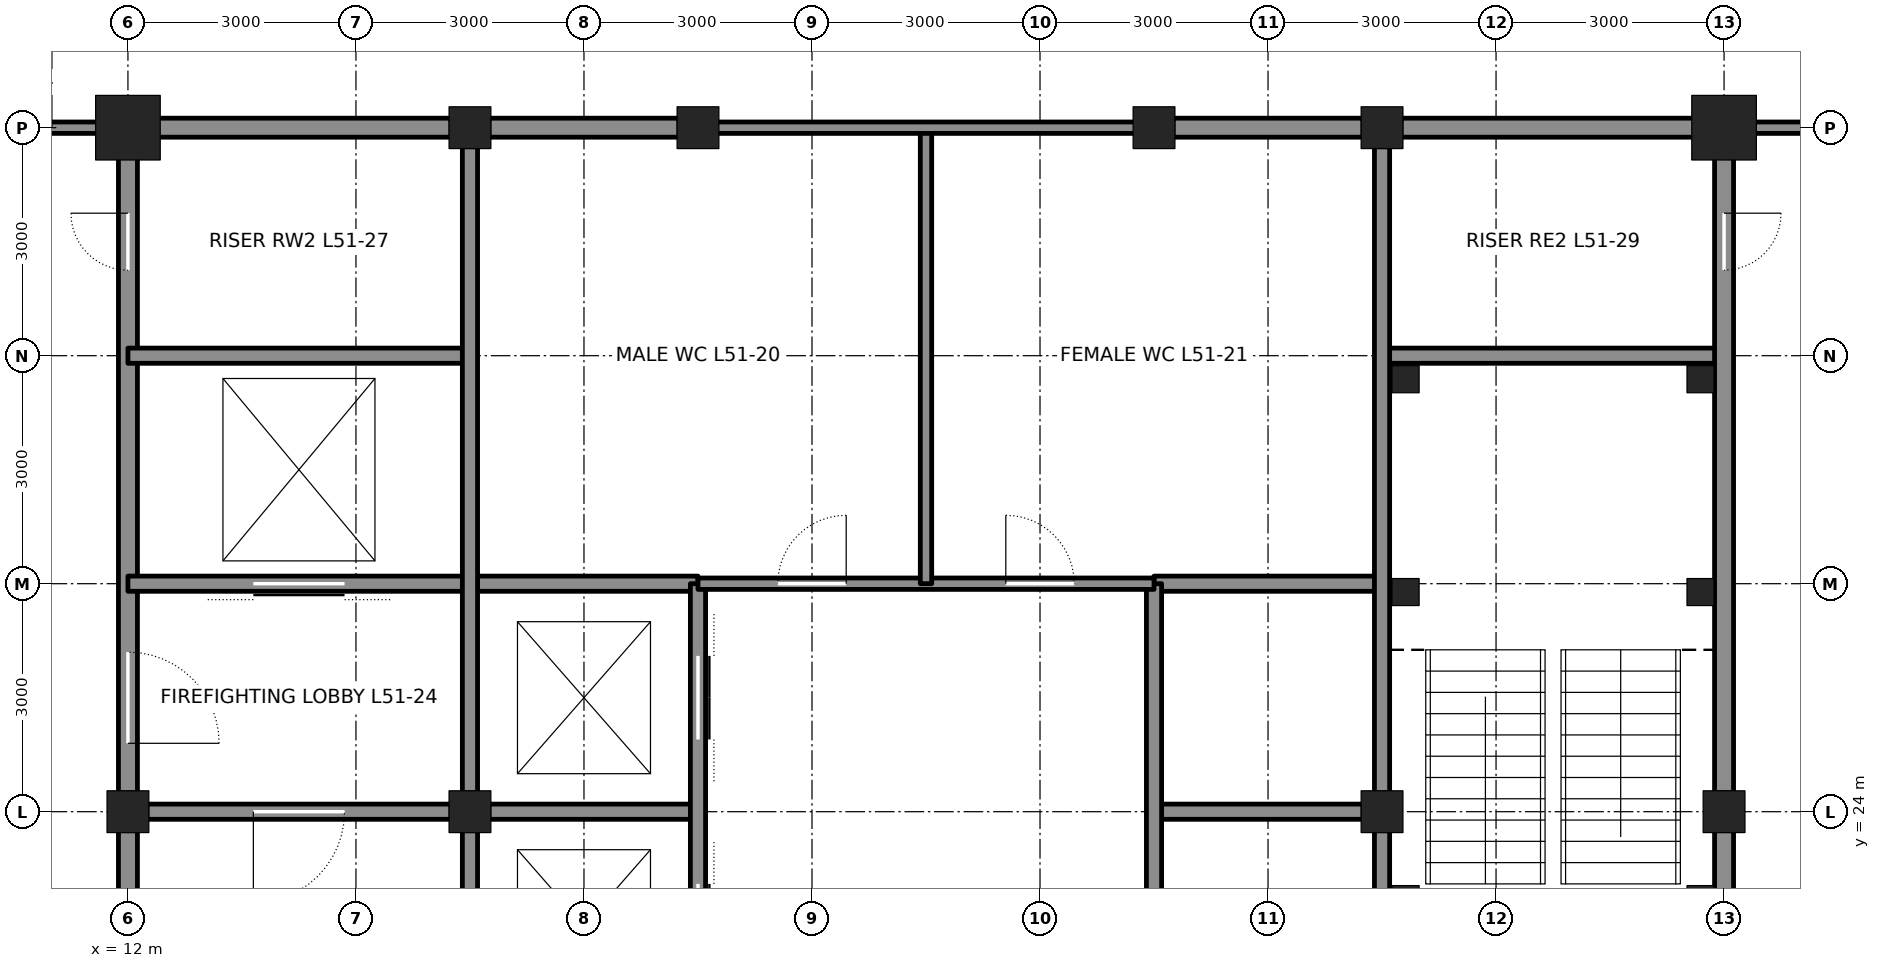
"""IFC4 building model, lengths in metres.
Left out: names, types, materials, properties, quantities, classifications, styles, units other than length and angle.
Written with IfcOpenShell. Run it as: python <this file> out.ifc"""

import sys

from ifc_helpers import new_model, si_unit, direction, frame, frame_2d, origin, origin_2d, place, context, subcontext, project, spatial, rectangle, hollow_rectangle, extrude, element, fill, save


model = new_model("IFC4")
c1 = context("Model", 3, precision=1e-05, world=origin(), true_north=direction((0.0, 1.0)))
c2 = subcontext(c1, "Body", "Model", "MODEL_VIEW")
j1 = project(units=[si_unit("LENGTHUNIT", "METRE"), si_unit("PLANEANGLEUNIT", "RADIAN")], contexts=[c1])
p1 = place(None, origin())
s1 = spatial("IfcSite", under=j1, at=p1, CompositionType="ELEMENT")
p2 = place(p1, origin())
s2 = spatial("IfcBuilding", under=s1, at=p2, CompositionType="ELEMENT")
p3 = place(p2, frame((0.0, 0.0, 230.7)))
s3 = spatial("IfcBuildingStorey", under=s2, at=p3, CompositionType="ELEMENT", Elevation=230.7)
p4 = place(p3, frame((12.0, 33.0, 0.0), z_axis=(0.0, 0.0, 1.0), x_axis=(1.0, 0.0, 0.0)))
e1 = element("IfcColumn", 1, at=p4, inside=s3, PredefinedType="COLUMN", context=c2, shape_type="SweptSolid", body=[
    extrude(hollow_rectangle(XDim=0.85, YDim=0.85, WallThickness=0.085, at=origin_2d()), origin(), (0.0, 0.0, 1.0), 4.2),
])
for number, where, z_axis, x_axis in (
    (2, (16.5, 33.0, 0.0), (0.0, 0.0, 1.0), (1.0, 0.0, 0.0)),
    (3, (19.5, 33.0, 0.0), (0.0, 0.0, 1.0), (1.0, 0.0, 0.0)),
    (4, (25.5, 33.0, 0.0), (0.0, 0.0, 1.0), (1.0, 0.0, 0.0)),
    (5, (28.5, 33.0, 0.0), (0.0, 0.0, 1.0), (1.0, 0.0, 0.0)),
):
    element("IfcColumn", number, at=place(p3, frame(where, z_axis=z_axis, x_axis=x_axis)), inside=s3, PredefinedType="COLUMN", context=c2, shape_type="SweptSolid", body=[
        extrude(hollow_rectangle(XDim=0.55, YDim=0.55, WallThickness=0.045, at=origin_2d()), origin(), (0.0, 0.0, 1.0), 4.2),
    ])
p5 = place(p3, frame((33.0, 33.0, 0.0), z_axis=(0.0, 0.0, 1.0), x_axis=(1.0, 0.0, 0.0)))
e6 = element("IfcColumn", 6, at=p5, inside=s3, PredefinedType="COLUMN", context=c2, shape_type="SweptSolid", body=[
    extrude(hollow_rectangle(XDim=0.85, YDim=0.85, WallThickness=0.085, at=origin_2d()), origin(), (0.0, 0.0, 1.0), 4.2),
])
for number, where, z_axis, x_axis in (
    (7, (12.0, 24.0, 0.0), (0.0, 0.0, 1.0), (1.0, 0.0, 0.0)),
    (8, (33.0, 24.0, 0.0), (0.0, 0.0, 1.0), (1.0, 0.0, 0.0)),
    (9, (16.5, 24.0, 0.0), (0.0, 0.0, 1.0), (1.0, 0.0, 0.0)),
    (10, (28.5, 24.0, 0.0), (0.0, 0.0, 1.0), (1.0, 0.0, 0.0)),
):
    element("IfcColumn", number, at=place(p3, frame(where, z_axis=z_axis, x_axis=x_axis)), inside=s3, PredefinedType="COLUMN", context=c2, shape_type="SweptSolid", body=[
        extrude(hollow_rectangle(XDim=0.55, YDim=0.55, WallThickness=0.045, at=origin_2d()), origin(), (0.0, 0.0, 1.0), 4.2),
    ])
p6 = place(p3, frame((12.0, 21.25, 0.0), z_axis=(0.0, 0.0, 1.0), x_axis=(0.0, 1.0, 0.0)))
e11 = element("IfcWall", 11, at=p6, inside=s3, PredefinedType="SOLIDWALL", context=c2, shape_type="SweptSolid", body=[
    extrude(rectangle(XDim=2.5, YDim=0.25, at=frame_2d((1.25, 0.0))), origin(), (0.0, 0.0, 1.0), 3.113),
])
p7 = place(p3, frame((12.0, 24.25, 0.0), z_axis=(0.0, 0.0, 1.0), x_axis=(0.0, 1.0, 0.0)))
e12 = element("IfcWall", 12, at=p7, inside=s3, PredefinedType="SOLIDWALL", context=c2, shape_type="SweptSolid", body=[
    extrude(rectangle(XDim=8.5, YDim=0.25, at=frame_2d((4.25, 0.0))), origin(), (0.0, 0.0, 1.0), 3.113),
])
p8 = place(p7, frame((0.65, 0.0, 0.0)))
e13 = element("IfcOpeningElement", 13, at=p8, cuts=e12, PredefinedType="OPENING", context=c2, shape_type="SweptSolid", body=[
    extrude(rectangle(XDim=1.2, YDim=2.1, at=frame_2d((0.6, 1.05))), frame((0.0, 0.135, 0.0), z_axis=(0.0, -1.0, 0.0), x_axis=(1.0, 0.0, 0.0)), (0.0, 0.0, 1.0), 0.27),
])
p9 = place(p7, frame((6.875, 0.0, 0.0)))
e14 = element("IfcOpeningElement", 14, at=p9, cuts=e12, PredefinedType="OPENING", context=c2, shape_type="SweptSolid", body=[
    extrude(rectangle(XDim=0.75, YDim=2.1, at=frame_2d((0.375, 1.05))), frame((0.0, 0.135, 0.0), z_axis=(0.0, -1.0, 0.0), x_axis=(1.0, 0.0, 0.0)), (0.0, 0.0, 1.0), 0.27),
])
p10 = place(p3, frame((12.25, 24.0, 0.0), z_axis=(0.0, 0.0, 1.0), x_axis=(1.0, 0.0, 0.0)))
e15 = element("IfcWall", 15, at=p10, inside=s3, PredefinedType="SOLIDWALL", context=c2, shape_type="SweptSolid", body=[
    extrude(rectangle(XDim=4.0, YDim=0.2, at=frame_2d((2.0, 0.0))), origin(), (0.0, 0.0, 1.0), 3.09),
])
p11 = place(p10, frame((1.4, 0.0, 0.0)))
e16 = element("IfcOpeningElement", 16, at=p11, cuts=e15, PredefinedType="OPENING", context=c2, shape_type="SweptSolid", body=[
    extrude(rectangle(XDim=1.2, YDim=2.1, at=frame_2d((0.6, 1.05))), frame((0.0, 0.11, 0.0), z_axis=(0.0, -1.0, 0.0), x_axis=(1.0, 0.0, 0.0)), (0.0, 0.0, 1.0), 0.22),
])
for number, where, z_axis, x_axis in (
    (17, (16.75, 24.0, 0.0), (0.0, 0.0, 1.0), (1.0, 0.0, 0.0)),
    (18, (25.5, 24.0, 0.0), (0.0, 0.0, 1.0), (1.0, 0.0, 0.0)),
):
    element("IfcWall", number, at=place(p3, frame(where, z_axis=z_axis, x_axis=x_axis)), inside=s3, PredefinedType="SOLIDWALL", context=c2, shape_type="SweptSolid", body=[
        extrude(rectangle(XDim=2.75, YDim=0.2, at=frame_2d((1.375, 0.0))), origin(), (0.0, 0.0, 1.0), 3.09),
    ])
p12 = place(p3, frame((12.0, 27.0, 0.0), z_axis=(0.0, 0.0, 1.0), x_axis=(1.0, 0.0, 0.0)))
e19 = element("IfcWall", 19, at=p12, inside=s3, PredefinedType="SOLIDWALL", context=c2, shape_type="SweptSolid", body=[
    extrude(rectangle(XDim=7.5, YDim=0.2, at=frame_2d((3.75, 0.0))), origin(), (0.0, 0.0, 1.0), 4.04),
])
p13 = place(p12, frame((1.65, 0.0, 0.0)))
e20 = element("IfcOpeningElement", 20, at=p13, cuts=e19, PredefinedType="OPENING", context=c2, shape_type="SweptSolid", body=[
    extrude(rectangle(XDim=1.2, YDim=2.1, at=frame_2d((0.6, 1.05))), frame((0.0, 0.11, 0.0), z_axis=(0.0, -1.0, 0.0), x_axis=(1.0, 0.0, 0.0)), (0.0, 0.0, 1.0), 0.22),
])
p14 = place(p3, frame((25.5, 27.0, 0.0), z_axis=(0.0, 0.0, 1.0), x_axis=(1.0, 0.0, 0.0)))
e21 = element("IfcWall", 21, at=p14, inside=s3, PredefinedType="SOLIDWALL", context=c2, shape_type="SweptSolid", body=[
    extrude(rectangle(XDim=3.0, YDim=0.2, at=frame_2d((1.5, 0.0))), origin(), (0.0, 0.0, 1.0), 4.04),
])
for number, where, z_axis, x_axis in (
    (22, (12.0, 30.0, 0.0), (0.0, 0.0, 1.0), (1.0, 0.0, 0.0)),
    (23, (28.5, 30.0, 0.0), (0.0, 0.0, 1.0), (1.0, 0.0, 0.0)),
):
    element("IfcWall", number, at=place(p3, frame(where, z_axis=z_axis, x_axis=x_axis)), inside=s3, PredefinedType="SOLIDWALL", context=c2, shape_type="SweptSolid", body=[
        extrude(rectangle(XDim=4.5, YDim=0.2, at=frame_2d((2.25, 0.0))), origin(), (0.0, 0.0, 1.0), 4.04),
    ])
p15 = place(p3, frame((12.25, 33.0, 0.0), z_axis=(0.0, 0.0, 1.0), x_axis=(1.0, 0.0, 0.0)))
e24 = element("IfcWall", 24, at=p15, inside=s3, PredefinedType="SOLIDWALL", context=c2, shape_type="SweptSolid", body=[
    extrude(rectangle(XDim=4.0, YDim=0.25, at=frame_2d((2.0, 0.0))), origin(), (0.0, 0.0, 1.0), 3.182),
])
for number, where, z_axis, x_axis in (
    (25, (16.75, 33.0, 0.0), (0.0, 0.0, 1.0), (1.0, 0.0, 0.0)),
    (26, (25.75, 33.0, 0.0), (0.0, 0.0, 1.0), (1.0, 0.0, 0.0)),
):
    element("IfcWall", number, at=place(p3, frame(where, z_axis=z_axis, x_axis=x_axis)), inside=s3, PredefinedType="SOLIDWALL", context=c2, shape_type="SweptSolid", body=[
        extrude(rectangle(XDim=2.5, YDim=0.25, at=frame_2d((1.25, 0.0))), origin(), (0.0, 0.0, 1.0), 3.182),
    ])
p16 = place(p3, frame((28.75, 33.0, 0.0), z_axis=(0.0, 0.0, 1.0), x_axis=(1.0, 0.0, 0.0)))
e27 = element("IfcWall", 27, at=p16, inside=s3, PredefinedType="SOLIDWALL", context=c2, shape_type="SweptSolid", body=[
    extrude(rectangle(XDim=4.0, YDim=0.25, at=frame_2d((2.0, 0.0))), origin(), (0.0, 0.0, 1.0), 3.182),
])
p17 = place(p3, frame((16.5, 21.25, 0.0), z_axis=(0.0, 0.0, 1.0), x_axis=(0.0, 1.0, 0.0)))
e28 = element("IfcWall", 28, at=p17, inside=s3, PredefinedType="SOLIDWALL", context=c2, shape_type="SweptSolid", body=[
    extrude(rectangle(XDim=2.5, YDim=0.2, at=frame_2d((1.25, 0.0))), origin(), (0.0, 0.0, 1.0), 3.113),
])
p18 = place(p3, frame((16.5, 24.25, 0.0), z_axis=(0.0, 0.0, 1.0), x_axis=(0.0, 1.0, 0.0)))
e29 = element("IfcWall", 29, at=p18, inside=s3, PredefinedType="SOLIDWALL", context=c2, shape_type="SweptSolid", body=[
    extrude(rectangle(XDim=8.5, YDim=0.2, at=frame_2d((4.25, 0.0))), origin(), (0.0, 0.0, 1.0), 3.113),
])
p19 = place(p3, frame((19.5, 15.0, 0.0), z_axis=(0.0, 0.0, 1.0), x_axis=(0.0, 1.0, 0.0)))
e30 = element("IfcWall", 30, at=p19, inside=s3, PredefinedType="SOLIDWALL", context=c2, shape_type="SweptSolid", body=[
    extrude(rectangle(XDim=12.0, YDim=0.2, at=frame_2d((6.0, 0.0))), origin(), (0.0, 0.0, 1.0), 3.065),
])
p20 = place(p19, frame((0.95, 0.0, 0.0)))
e31 = element("IfcOpeningElement", 31, at=p20, cuts=e30, PredefinedType="OPENING", context=c2, shape_type="SweptSolid", body=[
    extrude(rectangle(XDim=1.1, YDim=2.1, at=frame_2d((0.55, 1.05))), frame((0.0, 0.11, 0.0), z_axis=(0.0, -1.0, 0.0), x_axis=(1.0, 0.0, 0.0)), (0.0, 0.0, 1.0), 0.22),
])
p21 = place(p19, frame((3.95, 0.0, 0.0)))
e32 = element("IfcOpeningElement", 32, at=p21, cuts=e30, PredefinedType="OPENING", context=c2, shape_type="SweptSolid", body=[
    extrude(rectangle(XDim=1.1, YDim=2.1, at=frame_2d((0.55, 1.05))), frame((0.0, 0.11, 0.0), z_axis=(0.0, -1.0, 0.0), x_axis=(1.0, 0.0, 0.0)), (0.0, 0.0, 1.0), 0.22),
])
p22 = place(p19, frame((6.95, 0.0, 0.0)))
e33 = element("IfcOpeningElement", 33, at=p22, cuts=e30, PredefinedType="OPENING", context=c2, shape_type="SweptSolid", body=[
    extrude(rectangle(XDim=1.1, YDim=2.1, at=frame_2d((0.55, 1.05))), frame((0.0, 0.11, 0.0), z_axis=(0.0, -1.0, 0.0), x_axis=(1.0, 0.0, 0.0)), (0.0, 0.0, 1.0), 0.22),
])
p23 = place(p19, frame((9.95, 0.0, 0.0)))
e34 = element("IfcOpeningElement", 34, at=p23, cuts=e30, PredefinedType="OPENING", context=c2, shape_type="SweptSolid", body=[
    extrude(rectangle(XDim=1.1, YDim=2.1, at=frame_2d((0.55, 1.05))), frame((0.0, 0.11, 0.0), z_axis=(0.0, -1.0, 0.0), x_axis=(1.0, 0.0, 0.0)), (0.0, 0.0, 1.0), 0.22),
])
p24 = place(p3, frame((25.5, 15.0, 0.0), z_axis=(0.0, 0.0, 1.0), x_axis=(0.0, 1.0, 0.0)))
e35 = element("IfcWall", 35, at=p24, inside=s3, PredefinedType="SOLIDWALL", context=c2, shape_type="SweptSolid", body=[
    extrude(rectangle(XDim=12.0, YDim=0.2, at=frame_2d((6.0, 0.0))), origin(), (0.0, 0.0, 1.0), 3.065),
])
p25 = place(p3, frame((28.5, 21.25, 0.0), z_axis=(0.0, 0.0, 1.0), x_axis=(0.0, 1.0, 0.0)))
e36 = element("IfcWall", 36, at=p25, inside=s3, PredefinedType="SOLIDWALL", context=c2, shape_type="SweptSolid", body=[
    extrude(rectangle(XDim=2.5, YDim=0.2, at=frame_2d((1.25, 0.0))), origin(), (0.0, 0.0, 1.0), 3.113),
])
p26 = place(p3, frame((28.5, 24.25, 0.0), z_axis=(0.0, 0.0, 1.0), x_axis=(0.0, 1.0, 0.0)))
e37 = element("IfcWall", 37, at=p26, inside=s3, PredefinedType="SOLIDWALL", context=c2, shape_type="SweptSolid", body=[
    extrude(rectangle(XDim=8.5, YDim=0.2, at=frame_2d((4.25, 0.0))), origin(), (0.0, 0.0, 1.0), 3.113),
])
p27 = place(p3, frame((33.0, 21.25, 0.0), z_axis=(0.0, 0.0, 1.0), x_axis=(0.0, 1.0, 0.0)))
e38 = element("IfcWall", 38, at=p27, inside=s3, PredefinedType="SOLIDWALL", context=c2, shape_type="SweptSolid", body=[
    extrude(rectangle(XDim=2.5, YDim=0.25, at=frame_2d((1.25, 0.0))), origin(), (0.0, 0.0, 1.0), 3.113),
])
p28 = place(p3, frame((33.0, 24.25, 0.0), z_axis=(0.0, 0.0, 1.0), x_axis=(0.0, 1.0, 0.0)))
e39 = element("IfcWall", 39, at=p28, inside=s3, PredefinedType="SOLIDWALL", context=c2, shape_type="SweptSolid", body=[
    extrude(rectangle(XDim=8.5, YDim=0.25, at=frame_2d((4.25, 0.0))), origin(), (0.0, 0.0, 1.0), 3.113),
])
p29 = place(p28, frame((6.875, 0.0, 0.0)))
e40 = element("IfcOpeningElement", 40, at=p29, cuts=e39, PredefinedType="OPENING", context=c2, shape_type="SweptSolid", body=[
    extrude(rectangle(XDim=0.75, YDim=2.1, at=frame_2d((0.375, 1.05))), frame((0.0, 0.135, 0.0), z_axis=(0.0, -1.0, 0.0), x_axis=(1.0, 0.0, 0.0)), (0.0, 0.0, 1.0), 0.27),
])
p30 = place(p3, frame((19.5, 27.0, 0.0), z_axis=(0.0, 0.0, 1.0), x_axis=(1.0, 0.0, 0.0)))
e41 = element("IfcWall", 41, at=p30, inside=s3, PredefinedType="PARTITIONING", context=c2, shape_type="SweptSolid", body=[
    extrude(rectangle(XDim=6.0, YDim=0.15, at=frame_2d((3.0, 0.0))), origin(), (0.0, 0.0, 1.0), 4.04),
])
p31 = place(p30, frame((1.05, 0.0, 0.0)))
e42 = element("IfcOpeningElement", 42, at=p31, cuts=e41, PredefinedType="OPENING", context=c2, shape_type="SweptSolid", body=[
    extrude(rectangle(XDim=0.9, YDim=2.1, at=frame_2d((0.45, 1.05))), frame((0.0, 0.085, 0.0), z_axis=(0.0, -1.0, 0.0), x_axis=(1.0, 0.0, 0.0)), (0.0, 0.0, 1.0), 0.17),
])
p32 = place(p30, frame((4.05, 0.0, 0.0)))
e43 = element("IfcOpeningElement", 43, at=p32, cuts=e41, PredefinedType="OPENING", context=c2, shape_type="SweptSolid", body=[
    extrude(rectangle(XDim=0.9, YDim=2.1, at=frame_2d((0.45, 1.05))), frame((0.0, 0.085, 0.0), z_axis=(0.0, -1.0, 0.0), x_axis=(1.0, 0.0, 0.0)), (0.0, 0.0, 1.0), 0.17),
])
p33 = place(p3, frame((22.5, 27.0, 0.0), z_axis=(0.0, 0.0, 1.0), x_axis=(0.0, 1.0, 0.0)))
e44 = element("IfcWall", 44, at=p33, inside=s3, PredefinedType="PARTITIONING", context=c2, shape_type="SweptSolid", body=[
    extrude(rectangle(XDim=6.0, YDim=0.15, at=frame_2d((3.0, 0.0))), origin(), (0.0, 0.0, 1.0), 4.04),
])
p34 = place(p3, frame((19.5, 33.0, 0.0), z_axis=(0.0, 0.0, 1.0), x_axis=(1.0, 0.0, 0.0)))
e45 = element("IfcWall", 45, at=p34, inside=s3, PredefinedType="PARTITIONING", context=c2, shape_type="SweptSolid", body=[
    extrude(rectangle(XDim=6.0, YDim=0.15, at=frame_2d((3.0, 0.0))), origin(), (0.0, 0.0, 1.0), 3.182),
])
p35 = place(p3, frame((9.0, 33.0, 0.0), z_axis=(0.0, 0.0, 1.0), x_axis=(1.0, 0.0, 0.0)))
e46 = element("IfcWall", 46, at=p35, inside=s3, PredefinedType="PARTITIONING", context=c2, shape_type="SweptSolid", body=[
    extrude(rectangle(XDim=3.0, YDim=0.15, at=frame_2d((1.5, 0.0))), origin(), (0.0, 0.0, 1.0), 3.271),
])
p36 = place(p35, frame((1.0, 0.0, 0.0)))
e47 = element("IfcOpeningElement", 47, at=p36, cuts=e46, PredefinedType="OPENING", context=c2, shape_type="SweptSolid", body=[
    extrude(rectangle(XDim=1.0, YDim=2.4, at=frame_2d((0.5, 1.2))), frame((0.0, 0.085, 0.0), z_axis=(0.0, -1.0, 0.0), x_axis=(1.0, 0.0, 0.0)), (0.0, 0.0, 1.0), 0.17),
])
p37 = place(p3, frame((33.0, 33.0, 0.0), z_axis=(0.0, 0.0, 1.0), x_axis=(1.0, 0.0, 0.0)))
e48 = element("IfcWall", 48, at=p37, inside=s3, PredefinedType="PARTITIONING", context=c2, shape_type="SweptSolid", body=[
    extrude(rectangle(XDim=1.8, YDim=0.15, at=frame_2d((0.9, 0.0))), origin(), (0.0, 0.0, 1.0), 3.271),
])
for number, where, z_axis, x_axis in (
    (49, (28.81, 29.69, 0.0), (0.0, 0.0, 1.0), (1.0, 0.0, 0.0)),
    (50, (32.69, 29.69, 0.0), (0.0, 0.0, 1.0), (1.0, 0.0, 0.0)),
    (51, (28.81, 26.89, 0.0), (0.0, 0.0, 1.0), (1.0, 0.0, 0.0)),
    (52, (32.69, 26.89, 0.0), (0.0, 0.0, 1.0), (1.0, 0.0, 0.0)),
    (53, (28.81, 22.85, 0.0), (0.0, 0.0, 1.0), (1.0, 0.0, 0.0)),
    (54, (32.69, 22.85, 0.0), (0.0, 0.0, 1.0), (1.0, 0.0, 0.0)),
):
    element("IfcColumn", number, at=place(p3, frame(where, z_axis=z_axis, x_axis=x_axis)), inside=s3, PredefinedType="COLUMN", context=c2, shape_type="SweptSolid", body=[
        extrude(hollow_rectangle(XDim=0.356, YDim=0.356, WallThickness=0.009, at=origin_2d()), origin(), (0.0, 0.0, 1.0), 4.2),
    ])
p38 = place(p11, frame((1.2, 0.0, 0.0), z_axis=(0.0, 0.0, 1.0), x_axis=(-1.0, 0.0, 0.0)))
e55 = element("IfcDoor", 55, at=p38, inside=s3, OperationType="SINGLE_SWING_RIGHT", PredefinedType="DOOR", context=c2, shape_type="SweptSolid", body=[
    extrude(rectangle(XDim=1.2, YDim=2.1, at=frame_2d((0.6, 1.05))), frame((0.0, 0.025, 0.0), z_axis=(0.0, -1.0, 0.0), x_axis=(1.0, 0.0, 0.0)), (0.0, 0.0, 1.0), 0.05),
])
fill(e16, e55)
p39 = place(p8, frame((1.2, 0.0, 0.0), z_axis=(0.0, 0.0, 1.0), x_axis=(-1.0, 0.0, 0.0)))
e56 = element("IfcDoor", 56, at=p39, inside=s3, OperationType="SINGLE_SWING_RIGHT", PredefinedType="DOOR", context=c2, shape_type="SweptSolid", body=[
    extrude(rectangle(XDim=1.2, YDim=2.1, at=frame_2d((0.6, 1.05))), frame((0.0, 0.025, 0.0), z_axis=(0.0, -1.0, 0.0), x_axis=(1.0, 0.0, 0.0)), (0.0, 0.0, 1.0), 0.05),
])
fill(e13, e56)
p40 = place(p13, origin())
e57 = element("IfcDoor", 57, at=p40, inside=s3, OperationType="DOUBLE_DOOR_SLIDING", PredefinedType="DOOR", context=c2, shape_type="SweptSolid", body=[
    extrude(rectangle(XDim=1.2, YDim=2.1, at=frame_2d((0.6, 1.05))), frame((0.0, 0.025, 0.0), z_axis=(0.0, -1.0, 0.0), x_axis=(1.0, 0.0, 0.0)), (0.0, 0.0, 1.0), 0.05),
])
fill(e20, e57)
p41 = place(p9, origin())
e58 = element("IfcDoor", 58, at=p41, inside=s3, OperationType="SINGLE_SWING_RIGHT", PredefinedType="DOOR", context=c2, shape_type="SweptSolid", body=[
    extrude(rectangle(XDim=0.75, YDim=2.1, at=frame_2d((0.375, 1.05))), frame((0.0, 0.025, 0.0), z_axis=(0.0, -1.0, 0.0), x_axis=(1.0, 0.0, 0.0)), (0.0, 0.0, 1.0), 0.05),
])
fill(e14, e58)
p42 = place(p29, frame((0.75, 0.0, 0.0), z_axis=(0.0, 0.0, 1.0), x_axis=(-1.0, 0.0, 0.0)))
e59 = element("IfcDoor", 59, at=p42, inside=s3, OperationType="SINGLE_SWING_LEFT", PredefinedType="DOOR", context=c2, shape_type="SweptSolid", body=[
    extrude(rectangle(XDim=0.75, YDim=2.1, at=frame_2d((0.375, 1.05))), frame((0.0, 0.025, 0.0), z_axis=(0.0, -1.0, 0.0), x_axis=(1.0, 0.0, 0.0)), (0.0, 0.0, 1.0), 0.05),
])
fill(e40, e59)
p43 = place(p31, origin())
e60 = element("IfcDoor", 60, at=p43, inside=s3, OperationType="SINGLE_SWING_RIGHT", PredefinedType="DOOR", context=c2, shape_type="SweptSolid", body=[
    extrude(rectangle(XDim=0.9, YDim=2.1, at=frame_2d((0.45, 1.05))), frame((0.0, 0.025, 0.0), z_axis=(0.0, -1.0, 0.0), x_axis=(1.0, 0.0, 0.0)), (0.0, 0.0, 1.0), 0.05),
])
fill(e42, e60)
p44 = place(p32, origin())
e61 = element("IfcDoor", 61, at=p44, inside=s3, OperationType="SINGLE_SWING_LEFT", PredefinedType="DOOR", context=c2, shape_type="SweptSolid", body=[
    extrude(rectangle(XDim=0.9, YDim=2.1, at=frame_2d((0.45, 1.05))), frame((0.0, 0.025, 0.0), z_axis=(0.0, -1.0, 0.0), x_axis=(1.0, 0.0, 0.0)), (0.0, 0.0, 1.0), 0.05),
])
fill(e43, e61)
p45 = place(p22, origin())
e62 = element("IfcDoor", 62, at=p45, inside=s3, OperationType="DOUBLE_DOOR_SLIDING", PredefinedType="DOOR", context=c2, shape_type="SweptSolid", body=[
    extrude(rectangle(XDim=1.1, YDim=2.1, at=frame_2d((0.55, 1.05))), frame((0.0, 0.025, 0.0), z_axis=(0.0, -1.0, 0.0), x_axis=(1.0, 0.0, 0.0)), (0.0, 0.0, 1.0), 0.05),
])
fill(e33, e62)
p46 = place(p23, origin())
e63 = element("IfcDoor", 63, at=p46, inside=s3, OperationType="DOUBLE_DOOR_SLIDING", PredefinedType="DOOR", context=c2, shape_type="SweptSolid", body=[
    extrude(rectangle(XDim=1.1, YDim=2.1, at=frame_2d((0.55, 1.05))), frame((0.0, 0.025, 0.0), z_axis=(0.0, -1.0, 0.0), x_axis=(1.0, 0.0, 0.0)), (0.0, 0.0, 1.0), 0.05),
])
fill(e34, e63)
save(model, sys.argv[1])
